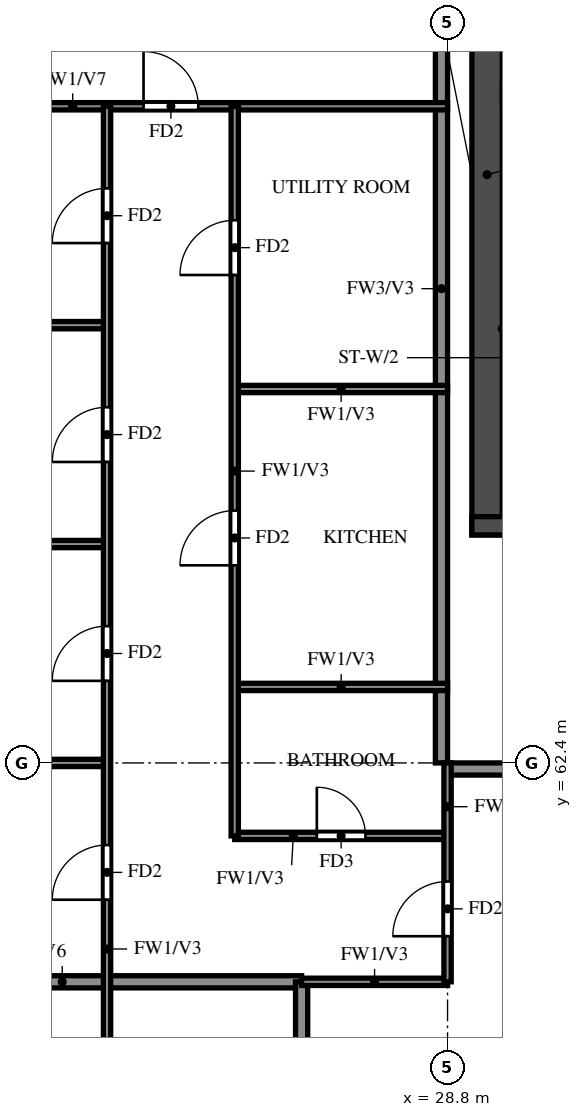
"""IFC4 building model, lengths in metres.
Left out: names, types, materials, properties, quantities, classifications, styles, units other than length and angle.
Written with IfcOpenShell. Run it as: python <this file> out.ifc"""

import sys

from ifc_helpers import new_model, si_unit, direction, frame, frame_2d, origin, place, context, subcontext, project, spatial, rectangle, extrude, element, fill, save


model = new_model("IFC4")
c1 = context("Model", 3, precision=1e-05, world=origin(), true_north=direction((0.0, 1.0)))
c2 = subcontext(c1, "Body", "Model", "MODEL_VIEW")
j1 = project(units=[si_unit("LENGTHUNIT", "METRE"), si_unit("PLANEANGLEUNIT", "RADIAN")], contexts=[c1])
p1 = place(None, origin())
s1 = spatial("IfcSite", under=j1, at=p1, CompositionType="ELEMENT")
p2 = place(p1, origin())
s2 = spatial("IfcBuilding", under=s1, at=p2, CompositionType="ELEMENT")
p3 = place(p2, frame((0.0, 0.0, 232.5)))
s3 = spatial("IfcBuildingStorey", under=s2, at=p3, CompositionType="ELEMENT", Elevation=232.5)
p4 = place(p3, frame((29.45, 66.15, 0.0), z_axis=(0.0, 0.0, 1.0), x_axis=(0.0, 1.0, 0.0)))
e1 = element("IfcWall", 1, at=p4, inside=s3, PredefinedType="SHEAR", context=c2, shape_type="SweptSolid", body=[
    extrude(rectangle(XDim=11.85, YDim=0.5, at=frame_2d((5.925, 0.0))), origin(), (0.0, 0.0, 1.0), 3.22),
])
p5 = place(p3, frame((29.2, 66.3, 0.0), z_axis=(0.0, 0.0, 1.0), x_axis=(1.0, 0.0, 0.0)))
e2 = element("IfcWall", 2, at=p5, inside=s3, PredefinedType="SHEAR", context=c2, shape_type="SweptSolid", body=[
    extrude(rectangle(XDim=42.4, YDim=0.3, at=frame_2d((21.2, 0.0))), origin(), (0.0, 0.0, 1.0), 3.22),
])
p6 = place(p5, frame((1.425, 0.0, 0.0)))
e3 = element("IfcOpeningElement", 3, at=p6, cuts=e2, PredefinedType="OPENING", context=c2, shape_type="SweptSolid", body=[
    extrude(rectangle(XDim=1.1, YDim=2.1, at=frame_2d((0.55, 1.05))), frame((0.0, 0.16, 0.0), z_axis=(0.0, -1.0, 0.0), x_axis=(1.0, 0.0, 0.0)), (0.0, 0.0, 1.0), 0.32),
])
p7 = place(p5, frame((4.2, 0.0, 0.0)))
e4 = element("IfcOpeningElement", 4, at=p7, cuts=e2, PredefinedType="OPENING", context=c2, shape_type="SweptSolid", body=[
    extrude(rectangle(XDim=1.8, YDim=2.1, at=frame_2d((0.9, 1.05))), frame((0.0, 0.16, 0.0), z_axis=(0.0, -1.0, 0.0), x_axis=(1.0, 0.0, 0.0)), (0.0, 0.0, 1.0), 0.32),
])
p8 = place(p3, frame((28.8, 62.3, 0.0), z_axis=(0.0, 0.0, 1.0), x_axis=(1.0, 0.0, 0.0)))
e5 = element("IfcWall", 5, at=p8, inside=s3, PredefinedType="SOLIDWALL", context=c2, shape_type="SweptSolid", body=[
    extrude(rectangle(XDim=4.8, YDim=0.2, at=frame_2d((2.4, 0.0))), origin(), (0.0, 0.0, 1.0), 3.22),
])
p9 = place(p3, frame((28.7, 62.4, 0.0), z_axis=(0.0, 0.0, 1.0), x_axis=(0.0, 1.0, 0.0)))
e6 = element("IfcWall", 6, at=p9, inside=s3, PredefinedType="SOLIDWALL", context=c2, shape_type="SweptSolid", body=[
    extrude(rectangle(XDim=15.6, YDim=0.2, at=frame_2d((7.8, 0.0))), origin(), (0.0, 0.0, 1.0), 3.22),
])
p10 = place(p3, frame((18.525, 58.8, 0.0), z_axis=(0.0, 0.0, 1.0), x_axis=(1.0, 0.0, 0.0)))
e7 = element("IfcWall", 7, at=p10, inside=s3, PredefinedType="SOLIDWALL", context=c2, shape_type="SweptSolid", body=[
    extrude(rectangle(XDim=7.875, YDim=0.2, at=frame_2d((3.938, 0.0))), origin(), (0.0, 0.0, 1.0), 2.32),
])
p11 = place(p3, frame((26.4, 56.4, 0.0), z_axis=(0.0, 0.0, 1.0), x_axis=(0.0, 1.0, 0.0)))
e8 = element("IfcWall", 8, at=p11, inside=s3, PredefinedType="SOLIDWALL", context=c2, shape_type="SweptSolid", body=[
    extrude(rectangle(XDim=2.4, YDim=0.2, at=frame_2d((1.2, 0.0))), origin(), (0.0, 0.0, 1.0), 3.22),
])
p12 = place(p3, frame((26.4, 58.8, 0.0), z_axis=(0.0, 0.0, 1.0), x_axis=(1.0, 0.0, 0.0)))
e9 = element("IfcWall", 9, at=p12, inside=s3, PredefinedType="PARTITIONING", context=c2, shape_type="SweptSolid", body=[
    extrude(rectangle(XDim=2.4, YDim=0.12, at=frame_2d((1.2, 0.0))), origin(), (0.0, 0.0, 1.0), 3.22),
])
p13 = place(p3, frame((25.3, 61.2, 0.0), z_axis=(0.0, 0.0, 1.0), x_axis=(1.0, 0.0, 0.0)))
e10 = element("IfcWall", 10, at=p13, inside=s3, PredefinedType="PARTITIONING", context=c2, shape_type="SweptSolid", body=[
    extrude(rectangle(XDim=3.5, YDim=0.12, at=frame_2d((1.75, 0.0))), origin(), (0.0, 0.0, 1.0), 3.22),
])
p14 = place(p13, frame((1.35, 0.0, 0.0)))
e11 = element("IfcOpeningElement", 11, at=p14, cuts=e10, PredefinedType="OPENING", context=c2, shape_type="SweptSolid", body=[
    extrude(rectangle(XDim=0.8, YDim=2.1, at=frame_2d((0.4, 1.05))), frame((0.0, 0.07, 0.0), z_axis=(0.0, -1.0, 0.0), x_axis=(1.0, 0.0, 0.0)), (0.0, 0.0, 1.0), 0.14),
])
p15 = place(p3, frame((18.525, 62.4, 0.0), z_axis=(0.0, 0.0, 1.0), x_axis=(1.0, 0.0, 0.0)))
e12 = element("IfcWall", 12, at=p15, inside=s3, PredefinedType="PARTITIONING", context=c2, shape_type="SweptSolid", body=[
    extrude(rectangle(XDim=4.675, YDim=0.12, at=frame_2d((2.337, 0.0))), origin(), (0.0, 0.0, 1.0), 3.22),
])
p16 = place(p3, frame((25.3, 63.65, 0.0), z_axis=(0.0, 0.0, 1.0), x_axis=(1.0, 0.0, 0.0)))
e13 = element("IfcWall", 13, at=p16, inside=s3, PredefinedType="PARTITIONING", context=c2, shape_type="SweptSolid", body=[
    extrude(rectangle(XDim=3.5, YDim=0.12, at=frame_2d((1.75, 0.0))), origin(), (0.0, 0.0, 1.0), 3.22),
])
p17 = place(p3, frame((18.525, 66.0, 0.0), z_axis=(0.0, 0.0, 1.0), x_axis=(1.0, 0.0, 0.0)))
e14 = element("IfcWall", 14, at=p17, inside=s3, PredefinedType="PARTITIONING", context=c2, shape_type="SweptSolid", body=[
    extrude(rectangle(XDim=4.675, YDim=0.12, at=frame_2d((2.337, 0.0))), origin(), (0.0, 0.0, 1.0), 2.32),
])
p18 = place(p3, frame((25.3, 68.55, 0.0), z_axis=(0.0, 0.0, 1.0), x_axis=(1.0, 0.0, 0.0)))
e15 = element("IfcWall", 15, at=p18, inside=s3, PredefinedType="PARTITIONING", context=c2, shape_type="SweptSolid", body=[
    extrude(rectangle(XDim=3.5, YDim=0.12, at=frame_2d((1.75, 0.0))), origin(), (0.0, 0.0, 1.0), 3.22),
])
p19 = place(p3, frame((18.525, 69.6, 0.0), z_axis=(0.0, 0.0, 1.0), x_axis=(1.0, 0.0, 0.0)))
e16 = element("IfcWall", 16, at=p19, inside=s3, PredefinedType="PARTITIONING", context=c2, shape_type="SweptSolid", body=[
    extrude(rectangle(XDim=4.675, YDim=0.12, at=frame_2d((2.337, 0.0))), origin(), (0.0, 0.0, 1.0), 3.22),
])
p20 = place(p3, frame((18.525, 73.2, 0.0), z_axis=(0.0, 0.0, 1.0), x_axis=(1.0, 0.0, 0.0)))
e17 = element("IfcWall", 17, at=p20, inside=s3, PredefinedType="PARTITIONING", context=c2, shape_type="SweptSolid", body=[
    extrude(rectangle(XDim=10.275, YDim=0.12, at=frame_2d((5.138, 0.0))), origin(), (0.0, 0.0, 1.0), 2.32),
])
p21 = place(p20, frame((5.275, 0.0, 0.0)))
e18 = element("IfcOpeningElement", 18, at=p21, cuts=e17, PredefinedType="OPENING", context=c2, shape_type="SweptSolid", body=[
    extrude(rectangle(XDim=0.9, YDim=2.1, at=frame_2d((0.45, 1.05))), frame((0.0, 0.07, 0.0), z_axis=(0.0, -1.0, 0.0), x_axis=(1.0, 0.0, 0.0)), (0.0, 0.0, 1.0), 0.14),
])
p22 = place(p3, frame((23.2, 48.0, 0.0), z_axis=(0.0, 0.0, 1.0), x_axis=(0.0, 1.0, 0.0)))
e19 = element("IfcWall", 19, at=p22, inside=s3, PredefinedType="PARTITIONING", context=c2, shape_type="SweptSolid", body=[
    extrude(rectangle(XDim=25.2, YDim=0.12, at=frame_2d((12.6, 0.0))), origin(), (0.0, 0.0, 1.0), 3.22),
])
p23 = place(p22, frame((2.85, 0.0, 0.0)))
e20 = element("IfcOpeningElement", 20, at=p23, cuts=e19, PredefinedType="OPENING", context=c2, shape_type="SweptSolid", body=[
    extrude(rectangle(XDim=1.5, YDim=2.1, at=frame_2d((0.75, 1.05))), frame((0.0, 0.07, 0.0), z_axis=(0.0, -1.0, 0.0), x_axis=(1.0, 0.0, 0.0)), (0.0, 0.0, 1.0), 0.14),
])
p24 = place(p22, frame((8.55, 0.0, 0.0)))
e21 = element("IfcOpeningElement", 21, at=p24, cuts=e19, PredefinedType="OPENING", context=c2, shape_type="SweptSolid", body=[
    extrude(rectangle(XDim=0.9, YDim=2.1, at=frame_2d((0.45, 1.05))), frame((0.0, 0.07, 0.0), z_axis=(0.0, -1.0, 0.0), x_axis=(1.0, 0.0, 0.0)), (0.0, 0.0, 1.0), 0.14),
])
p25 = place(p22, frame((12.15, 0.0, 0.0)))
e22 = element("IfcOpeningElement", 22, at=p25, cuts=e19, PredefinedType="OPENING", context=c2, shape_type="SweptSolid", body=[
    extrude(rectangle(XDim=0.9, YDim=2.1, at=frame_2d((0.45, 1.05))), frame((0.0, 0.07, 0.0), z_axis=(0.0, -1.0, 0.0), x_axis=(1.0, 0.0, 0.0)), (0.0, 0.0, 1.0), 0.14),
])
p26 = place(p22, frame((15.75, 0.0, 0.0)))
e23 = element("IfcOpeningElement", 23, at=p26, cuts=e19, PredefinedType="OPENING", context=c2, shape_type="SweptSolid", body=[
    extrude(rectangle(XDim=0.9, YDim=2.1, at=frame_2d((0.45, 1.05))), frame((0.0, 0.07, 0.0), z_axis=(0.0, -1.0, 0.0), x_axis=(1.0, 0.0, 0.0)), (0.0, 0.0, 1.0), 0.14),
])
p27 = place(p22, frame((19.35, 0.0, 0.0)))
e24 = element("IfcOpeningElement", 24, at=p27, cuts=e19, PredefinedType="OPENING", context=c2, shape_type="SweptSolid", body=[
    extrude(rectangle(XDim=0.9, YDim=2.1, at=frame_2d((0.45, 1.05))), frame((0.0, 0.07, 0.0), z_axis=(0.0, -1.0, 0.0), x_axis=(1.0, 0.0, 0.0)), (0.0, 0.0, 1.0), 0.14),
])
p28 = place(p22, frame((22.95, 0.0, 0.0)))
e25 = element("IfcOpeningElement", 25, at=p28, cuts=e19, PredefinedType="OPENING", context=c2, shape_type="SweptSolid", body=[
    extrude(rectangle(XDim=0.9, YDim=2.1, at=frame_2d((0.45, 1.05))), frame((0.0, 0.07, 0.0), z_axis=(0.0, -1.0, 0.0), x_axis=(1.0, 0.0, 0.0)), (0.0, 0.0, 1.0), 0.14),
])
p29 = place(p3, frame((25.3, 61.2, 0.0), z_axis=(0.0, 0.0, 1.0), x_axis=(0.0, 1.0, 0.0)))
e26 = element("IfcWall", 26, at=p29, inside=s3, PredefinedType="PARTITIONING", context=c2, shape_type="SweptSolid", body=[
    extrude(rectangle(XDim=12.0, YDim=0.12, at=frame_2d((6.0, 0.0))), origin(), (0.0, 0.0, 1.0), 3.22),
])
p30 = place(p29, frame((4.45, 0.0, 0.0)))
e27 = element("IfcOpeningElement", 27, at=p30, cuts=e26, PredefinedType="OPENING", context=c2, shape_type="SweptSolid", body=[
    extrude(rectangle(XDim=0.9, YDim=2.1, at=frame_2d((0.45, 1.05))), frame((0.0, 0.07, 0.0), z_axis=(0.0, -1.0, 0.0), x_axis=(1.0, 0.0, 0.0)), (0.0, 0.0, 1.0), 0.14),
])
p31 = place(p29, frame((9.225, 0.0, 0.0)))
e28 = element("IfcOpeningElement", 28, at=p31, cuts=e26, PredefinedType="OPENING", context=c2, shape_type="SweptSolid", body=[
    extrude(rectangle(XDim=0.9, YDim=2.1, at=frame_2d((0.45, 1.05))), frame((0.0, 0.07, 0.0), z_axis=(0.0, -1.0, 0.0), x_axis=(1.0, 0.0, 0.0)), (0.0, 0.0, 1.0), 0.14),
])
p32 = place(p3, frame((28.8, 58.8, 0.0), z_axis=(0.0, 0.0, 1.0), x_axis=(0.0, 1.0, 0.0)))
e29 = element("IfcWall", 29, at=p32, inside=s3, PredefinedType="PARTITIONING", context=c2, shape_type="SweptSolid", body=[
    extrude(rectangle(XDim=3.6, YDim=0.12, at=frame_2d((1.8, 0.0))), origin(), (0.0, 0.0, 1.0), 3.22),
])
p33 = place(p32, frame((0.75, 0.0, 0.0)))
e30 = element("IfcOpeningElement", 30, at=p33, cuts=e29, PredefinedType="OPENING", context=c2, shape_type="SweptSolid", body=[
    extrude(rectangle(XDim=0.9, YDim=2.1, at=frame_2d((0.45, 1.05))), frame((0.0, 0.07, 0.0), z_axis=(0.0, -1.0, 0.0), x_axis=(1.0, 0.0, 0.0)), (0.0, 0.0, 1.0), 0.14),
])
p34 = place(p33, origin())
e31 = element("IfcDoor", 31, at=p34, inside=s3, OperationType="SINGLE_SWING_RIGHT", PredefinedType="DOOR", context=c2, shape_type="SweptSolid", body=[
    extrude(rectangle(XDim=0.9, YDim=2.1, at=frame_2d((0.45, 1.05))), frame((0.0, 0.025, 0.0), z_axis=(0.0, -1.0, 0.0), x_axis=(1.0, 0.0, 0.0)), (0.0, 0.0, 1.0), 0.05),
])
fill(e30, e31)
p35 = place(p25, origin())
e32 = element("IfcDoor", 32, at=p35, inside=s3, OperationType="SINGLE_SWING_LEFT", PredefinedType="DOOR", context=c2, shape_type="SweptSolid", body=[
    extrude(rectangle(XDim=0.9, YDim=2.1, at=frame_2d((0.45, 1.05))), frame((0.0, 0.025, 0.0), z_axis=(0.0, -1.0, 0.0), x_axis=(1.0, 0.0, 0.0)), (0.0, 0.0, 1.0), 0.05),
])
fill(e22, e32)
p36 = place(p26, origin())
e33 = element("IfcDoor", 33, at=p36, inside=s3, OperationType="SINGLE_SWING_RIGHT", PredefinedType="DOOR", context=c2, shape_type="SweptSolid", body=[
    extrude(rectangle(XDim=0.9, YDim=2.1, at=frame_2d((0.45, 1.05))), frame((0.0, 0.025, 0.0), z_axis=(0.0, -1.0, 0.0), x_axis=(1.0, 0.0, 0.0)), (0.0, 0.0, 1.0), 0.05),
])
fill(e23, e33)
p37 = place(p27, origin())
e34 = element("IfcDoor", 34, at=p37, inside=s3, OperationType="SINGLE_SWING_LEFT", PredefinedType="DOOR", context=c2, shape_type="SweptSolid", body=[
    extrude(rectangle(XDim=0.9, YDim=2.1, at=frame_2d((0.45, 1.05))), frame((0.0, 0.025, 0.0), z_axis=(0.0, -1.0, 0.0), x_axis=(1.0, 0.0, 0.0)), (0.0, 0.0, 1.0), 0.05),
])
fill(e24, e34)
p38 = place(p28, origin())
e35 = element("IfcDoor", 35, at=p38, inside=s3, OperationType="SINGLE_SWING_LEFT", PredefinedType="DOOR", context=c2, shape_type="SweptSolid", body=[
    extrude(rectangle(XDim=0.9, YDim=2.1, at=frame_2d((0.45, 1.05))), frame((0.0, 0.025, 0.0), z_axis=(0.0, -1.0, 0.0), x_axis=(1.0, 0.0, 0.0)), (0.0, 0.0, 1.0), 0.05),
])
fill(e25, e35)
p39 = place(p21, origin())
e36 = element("IfcDoor", 36, at=p39, inside=s3, OperationType="SINGLE_SWING_RIGHT", PredefinedType="DOOR", context=c2, shape_type="SweptSolid", body=[
    extrude(rectangle(XDim=0.9, YDim=2.1, at=frame_2d((0.45, 1.05))), frame((0.0, 0.025, 0.0), z_axis=(0.0, -1.0, 0.0), x_axis=(1.0, 0.0, 0.0)), (0.0, 0.0, 1.0), 0.05),
])
fill(e18, e36)
p40 = place(p14, origin())
e37 = element("IfcDoor", 37, at=p40, inside=s3, OperationType="SINGLE_SWING_LEFT", PredefinedType="DOOR", context=c2, shape_type="SweptSolid", body=[
    extrude(rectangle(XDim=0.8, YDim=2.1, at=frame_2d((0.4, 1.05))), frame((0.0, 0.025, 0.0), z_axis=(0.0, -1.0, 0.0), x_axis=(1.0, 0.0, 0.0)), (0.0, 0.0, 1.0), 0.05),
])
fill(e11, e37)
p41 = place(p30, origin())
e38 = element("IfcDoor", 38, at=p41, inside=s3, OperationType="SINGLE_SWING_LEFT", PredefinedType="DOOR", context=c2, shape_type="SweptSolid", body=[
    extrude(rectangle(XDim=0.9, YDim=2.1, at=frame_2d((0.45, 1.05))), frame((0.0, 0.025, 0.0), z_axis=(0.0, -1.0, 0.0), x_axis=(1.0, 0.0, 0.0)), (0.0, 0.0, 1.0), 0.05),
])
fill(e27, e38)
p42 = place(p31, origin())
e39 = element("IfcDoor", 39, at=p42, inside=s3, OperationType="SINGLE_SWING_RIGHT", PredefinedType="DOOR", context=c2, shape_type="SweptSolid", body=[
    extrude(rectangle(XDim=0.9, YDim=2.1, at=frame_2d((0.45, 1.05))), frame((0.0, 0.025, 0.0), z_axis=(0.0, -1.0, 0.0), x_axis=(1.0, 0.0, 0.0)), (0.0, 0.0, 1.0), 0.05),
])
fill(e28, e39)
save(model, sys.argv[1])
